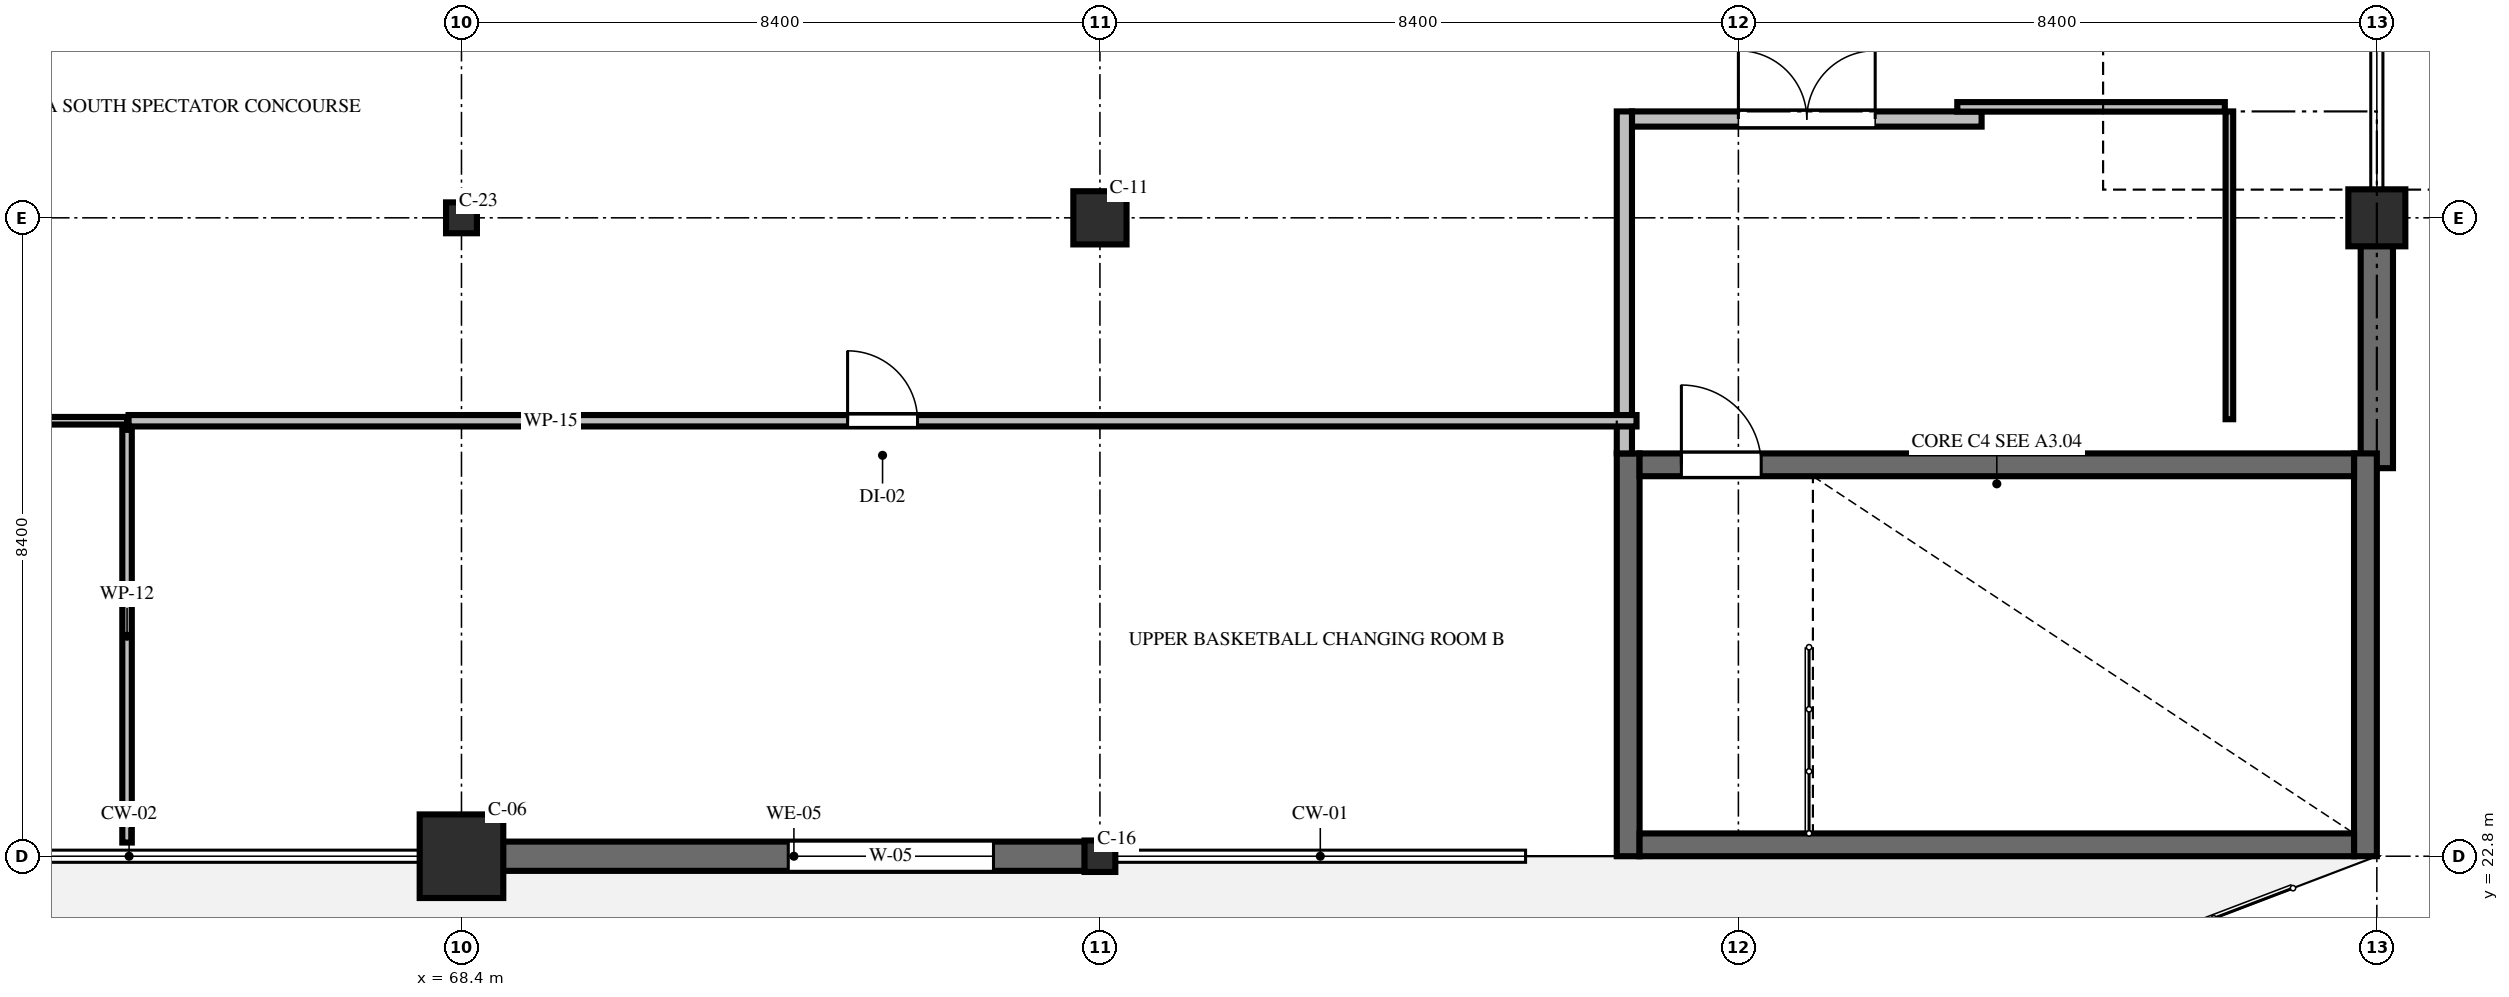
"""IFC4 building model, lengths in metres.
Left out: names, types, materials, properties, quantities, classifications, styles, units other than length and angle.
Written with IfcOpenShell. Run it as: python <this file> out.ifc"""

import sys

from ifc_helpers import new_model, si_unit, direction, frame, frame_2d, origin, origin_2d, place, context, subcontext, project, spatial, rectangle, circle, hollow_circle, i_section, extrude, element, fill, save


model = new_model("IFC4")
c1 = context("Model", 3, precision=1e-05, world=origin(), true_north=direction((0.0, 1.0)))
c2 = subcontext(c1, "Body", "Model", "MODEL_VIEW")
j1 = project(units=[si_unit("LENGTHUNIT", "METRE"), si_unit("PLANEANGLEUNIT", "RADIAN")], contexts=[c1])
p1 = place(None, origin())
s1 = spatial("IfcSite", under=j1, at=p1, CompositionType="ELEMENT")
p2 = place(p1, origin())
s2 = spatial("IfcBuilding", under=s1, at=p2, CompositionType="ELEMENT")
p3 = place(p2, frame((0.0, 0.0, 16.8)))
s3 = spatial("IfcBuildingStorey", under=s2, at=p3, CompositionType="ELEMENT", Elevation=16.8)
p4 = place(p3, frame((68.4, 22.8, 0.0), z_axis=(0.0, 0.0, 1.0), x_axis=(1.0, 0.0, 0.0)))
e1 = element("IfcColumn", 1, at=p4, inside=s3, PredefinedType="COLUMN", context=c2, shape_type="SweptSolid", body=[
    extrude(rectangle(XDim=1.1, YDim=1.1, at=origin_2d()), origin(), (0.0, 0.0, 1.0), 5.4),
])
p5 = place(p3, frame((68.4, 31.2, 0.0), z_axis=(0.0, 0.0, 1.0), x_axis=(1.0, 0.0, 0.0)))
e2 = element("IfcColumn", 2, at=p5, inside=s3, PredefinedType="COLUMN", context=c2, shape_type="SweptSolid", body=[
    extrude(hollow_circle(Radius=0.203, WallThickness=0.016, at=origin_2d()), origin(), (0.0, 0.0, 1.0), 5.4),
])
p6 = place(p3, frame((76.8, 22.8, 0.0), z_axis=(0.0, 0.0, 1.0), x_axis=(1.0, 0.0, 0.0)))
e3 = element("IfcColumn", 3, at=p6, inside=s3, PredefinedType="COLUMN", context=c2, shape_type="SweptSolid", body=[
    extrude(i_section(OverallWidth=0.405, OverallDepth=0.414, WebThickness=0.018, FlangeThickness=0.028, FilletRadius=0.022, at=origin_2d()), origin(), (0.0, 0.0, 1.0), 5.4),
])
p7 = place(p3, frame((76.8, 31.2, 0.0), z_axis=(0.0, 0.0, 1.0), x_axis=(1.0, 0.0, 0.0)))
e4 = element("IfcColumn", 4, at=p7, inside=s3, PredefinedType="COLUMN", context=c2, shape_type="SweptSolid", body=[
    extrude(circle(Radius=0.35, at=origin_2d()), origin(), (0.0, 0.0, 1.0), 5.4),
])
p8 = place(p3, frame((93.6, 31.2, 0.0), z_axis=(0.0, 0.0, 1.0), x_axis=(1.0, 0.0, 0.0)))
e5 = element("IfcColumn", 5, at=p8, inside=s3, PredefinedType="COLUMN", context=c2, shape_type="SweptSolid", body=[
    extrude(rectangle(XDim=0.75, YDim=0.75, at=origin_2d()), origin(), (0.0, 0.0, 1.0), 5.4),
])
p9 = place(p3, frame((76.602, 22.8, 0.0), z_axis=(0.0, 0.0, 1.0), x_axis=(-1.0, 0.0, 0.0)))
e6 = element("IfcWall", 6, at=p9, inside=s3, PredefinedType="SOLIDWALL", context=c2, shape_type="SweptSolid", body=[
    extrude(rectangle(XDim=7.656, YDim=0.385, at=frame_2d((3.828, 0.0))), origin(), (0.0, 0.0, 1.0), 4.42),
])
p10 = place(p9, frame((1.202, 0.0, 0.9)))
e7 = element("IfcOpeningElement", 7, at=p10, cuts=e6, PredefinedType="OPENING", context=c2, shape_type="SweptSolid", body=[
    extrude(rectangle(XDim=2.7, YDim=2.0, at=frame_2d((1.35, 1.0))), frame((0.0, 0.202, 0.0), z_axis=(0.0, -1.0, 0.0), x_axis=(1.0, 0.0, 0.0)), (0.0, 0.0, 1.0), 0.405),
])
p11 = place(p3, frame((93.6, 30.829, 0.0), z_axis=(0.0, 0.0, 1.0), x_axis=(0.0, -1.0, 0.0)))
e8 = element("IfcWall", 8, at=p11, inside=s3, PredefinedType="SOLIDWALL", context=c2, shape_type="SweptSolid", body=[
    extrude(rectangle(XDim=2.923, YDim=0.425, at=frame_2d((1.461, 0.0))), origin(), (0.0, 0.0, 1.0), 5.1),
])
for number, where, z_axis, x_axis in (
    (9, (83.75, 22.8, 0.0), (0.0, 0.0, 1.0), (0.0, 1.0, 0.0)),
    (10, (93.45, 28.1, 0.0), (0.0, 0.0, 1.0), (0.0, -1.0, 0.0)),
):
    element("IfcWall", number, at=place(p3, frame(where, z_axis=z_axis, x_axis=x_axis)), inside=s3, PredefinedType="SHEAR", context=c2, shape_type="SweptSolid", body=[
        extrude(rectangle(XDim=5.3, YDim=0.3, at=frame_2d((2.65, 0.0))), origin(), (0.0, 0.0, 1.0), 5.12),
    ])
p12 = place(p3, frame((93.3, 22.95, 0.0), z_axis=(0.0, 0.0, 1.0), x_axis=(-1.0, 0.0, 0.0)))
e11 = element("IfcWall", 11, at=p12, inside=s3, PredefinedType="SHEAR", context=c2, shape_type="SweptSolid", body=[
    extrude(rectangle(XDim=9.4, YDim=0.3, at=frame_2d((4.7, 0.0))), origin(), (0.0, 0.0, 1.0), 5.12),
])
p13 = place(p3, frame((83.9, 27.95, 0.0), z_axis=(0.0, 0.0, 1.0), x_axis=(1.0, 0.0, 0.0)))
e12 = element("IfcWall", 12, at=p13, inside=s3, PredefinedType="SHEAR", context=c2, shape_type="SweptSolid", body=[
    extrude(rectangle(XDim=9.4, YDim=0.3, at=frame_2d((4.7, 0.0))), origin(), (0.0, 0.0, 1.0), 5.12),
])
p14 = place(p13, frame((0.55, 0.0, 0.0)))
e13 = element("IfcOpeningElement", 13, at=p14, cuts=e12, PredefinedType="OPENING", context=c2, shape_type="SweptSolid", body=[
    extrude(rectangle(XDim=1.05, YDim=2.2, at=frame_2d((0.525, 1.1))), frame((0.0, 0.16, 0.0), z_axis=(0.0, -1.0, 0.0), x_axis=(1.0, 0.0, 0.0)), (0.0, 0.0, 1.0), 0.32),
])
p15 = place(p3, frame((83.8, 32.5, 0.0), z_axis=(0.0, 0.0, 1.0), x_axis=(1.0, 0.0, 0.0)))
e14 = element("IfcWall", 14, at=p15, inside=s3, PredefinedType="SOLIDWALL", context=c2, shape_type="SweptSolid", body=[
    extrude(rectangle(XDim=4.6, YDim=0.2, at=frame_2d((2.3, 0.0))), origin(), (0.0, 0.0, 1.0), 5.05),
])
p16 = place(p15, frame((1.4, 0.0, 0.0)))
e15 = element("IfcOpeningElement", 15, at=p16, cuts=e14, PredefinedType="OPENING", context=c2, shape_type="SweptSolid", body=[
    extrude(rectangle(XDim=1.8, YDim=2.2, at=frame_2d((0.9, 1.1))), frame((0.0, 0.11, 0.0), z_axis=(0.0, -1.0, 0.0), x_axis=(1.0, 0.0, 0.0)), (0.0, 0.0, 1.0), 0.22),
])
p17 = place(p3, frame((83.7, 28.1, 0.0), z_axis=(0.0, 0.0, 1.0), x_axis=(0.0, 1.0, 0.0)))
e16 = element("IfcWall", 16, at=p17, inside=s3, PredefinedType="SOLIDWALL", context=c2, shape_type="SweptSolid", body=[
    extrude(rectangle(XDim=4.5, YDim=0.2, at=frame_2d((2.25, 0.0))), origin(), (0.0, 0.0, 1.0), 5.05),
])
p18 = place(p3, frame((44.54, 28.53, 0.0), z_axis=(0.0, 0.0, 1.0), x_axis=(1.0, 0.0, 0.0)))
e17 = element("IfcWall", 17, at=p18, inside=s3, PredefinedType="PARTITIONING", context=c2, shape_type="SweptSolid", body=[
    extrude(rectangle(XDim=19.46, YDim=0.1, at=frame_2d((9.73, 0.0))), origin(), (0.0, 0.0, 1.0), 4.11),
])
p19 = place(p18, frame((9.27, 0.0, 0.0)))
e18 = element("IfcOpeningElement", 18, at=p19, cuts=e17, PredefinedType="OPENING", context=c2, shape_type="SweptSolid", body=[
    extrude(rectangle(XDim=0.92, YDim=2.15, at=frame_2d((0.46, 1.075))), frame((0.0, 0.06, 0.0), z_axis=(0.0, -1.0, 0.0), x_axis=(1.0, 0.0, 0.0)), (0.0, 0.0, 1.0), 0.12),
])
p20 = place(p3, frame((64.0, 28.41, 0.0), z_axis=(0.0, 0.0, 1.0), x_axis=(0.0, -1.0, 0.0)))
e19 = element("IfcWall", 19, at=p20, inside=s3, PredefinedType="PARTITIONING", context=c2, shape_type="SweptSolid", body=[
    extrude(rectangle(XDim=5.43, YDim=0.125, at=frame_2d((2.715, 0.0))), origin(), (0.0, 0.0, 1.0), 4.16),
])
p21 = place(p3, frame((64.02, 28.53, 0.0), z_axis=(0.0, 0.0, 1.0), x_axis=(1.0, 0.0, 0.0)))
e20 = element("IfcWall", 20, at=p21, inside=s3, PredefinedType="PARTITIONING", context=c2, shape_type="SweptSolid", body=[
    extrude(rectangle(XDim=19.84, YDim=0.15, at=frame_2d((9.92, 0.0))), origin(), (0.0, 0.0, 1.0), 4.422),
])
p22 = place(p21, frame((9.46, 0.0, 0.0)))
e21 = element("IfcOpeningElement", 21, at=p22, cuts=e20, PredefinedType="OPENING", context=c2, shape_type="SweptSolid", body=[
    extrude(rectangle(XDim=0.92, YDim=2.15, at=frame_2d((0.46, 1.075))), frame((0.0, 0.085, 0.0), z_axis=(0.0, -1.0, 0.0), x_axis=(1.0, 0.0, 0.0)), (0.0, 0.0, 1.0), 0.17),
])
p23 = place(p3, frame((91.66, 28.55, 0.0), z_axis=(0.0, 0.0, 1.0), x_axis=(0.0, 1.0, 0.0)))
e22 = element("IfcWall", 22, at=p23, inside=s3, PredefinedType="PARTITIONING", context=c2, shape_type="SweptSolid", body=[
    extrude(rectangle(XDim=4.05, YDim=0.1, at=frame_2d((2.025, 0.0))), origin(), (0.0, 0.0, 1.0), 5.05),
])
p24 = place(p3, frame((91.6, 32.66, 0.0), z_axis=(0.0, 0.0, 1.0), x_axis=(-1.0, 0.0, 0.0)))
e23 = element("IfcWall", 23, at=p24, inside=s3, PredefinedType="PARTITIONING", context=c2, shape_type="SweptSolid", body=[
    extrude(rectangle(XDim=3.52, YDim=0.125, at=frame_2d((1.76, 0.0))), origin(), (0.0, 0.0, 1.0), 5.05),
])
p25 = place(p10, origin())
e24 = element("IfcWindow", 24, at=p25, inside=s3, PartitioningType="TRIPLE_PANEL_VERTICAL", PredefinedType="WINDOW", context=c2, shape_type="SweptSolid", body=[
    extrude(rectangle(XDim=2.7, YDim=2.0, at=frame_2d((1.35, 1.0))), frame((0.0, 0.03, 0.0), z_axis=(0.0, -1.0, 0.0), x_axis=(1.0, 0.0, 0.0)), (0.0, 0.0, 1.0), 0.06),
])
fill(e7, e24)
p26 = place(p14, origin())
e25 = element("IfcDoor", 25, at=p26, inside=s3, OperationType="SINGLE_SWING_LEFT", PredefinedType="DOOR", context=c2, shape_type="SweptSolid", body=[
    extrude(rectangle(XDim=1.05, YDim=2.2, at=frame_2d((0.525, 1.1))), frame((0.0, 0.025, 0.0), z_axis=(0.0, -1.0, 0.0), x_axis=(1.0, 0.0, 0.0)), (0.0, 0.0, 1.0), 0.05),
])
fill(e13, e25)
p27 = place(p16, origin())
e26 = element("IfcDoor", 26, at=p27, inside=s3, OperationType="DOUBLE_DOOR_SINGLE_SWING", PredefinedType="DOOR", context=c2, shape_type="SweptSolid", body=[
    extrude(rectangle(XDim=1.8, YDim=2.2, at=frame_2d((0.9, 1.1))), frame((0.0, 0.025, 0.0), z_axis=(0.0, -1.0, 0.0), x_axis=(1.0, 0.0, 0.0)), (0.0, 0.0, 1.0), 0.05),
])
fill(e15, e26)
p28 = place(p22, origin())
e27 = element("IfcDoor", 27, at=p28, inside=s3, OperationType="SINGLE_SWING_LEFT", PredefinedType="DOOR", context=c2, shape_type="SweptSolid", body=[
    extrude(rectangle(XDim=0.92, YDim=2.15, at=frame_2d((0.46, 1.075))), frame((0.0, 0.025, 0.0), z_axis=(0.0, -1.0, 0.0), x_axis=(1.0, 0.0, 0.0)), (0.0, 0.0, 1.0), 0.05),
])
fill(e21, e27)
save(model, sys.argv[1])
